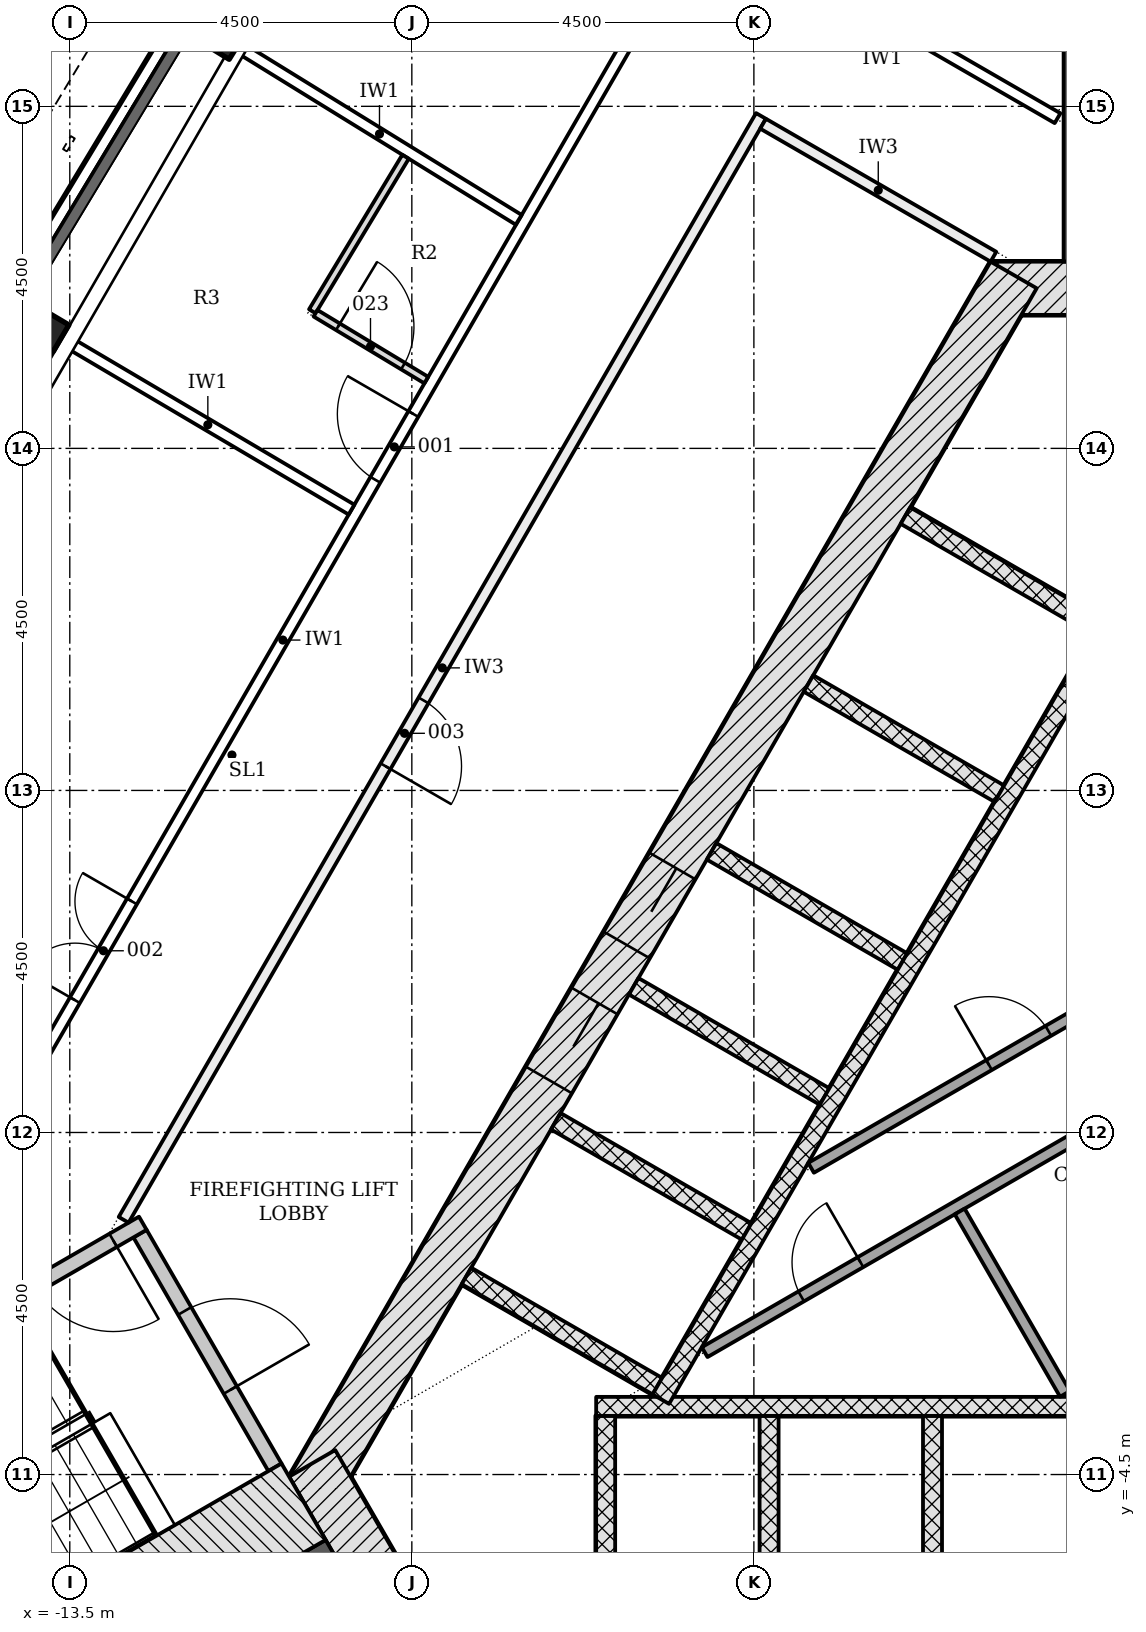
"""IFC4 building model, lengths in metres.
Left out: names, types, materials, properties, quantities, classifications, styles, units other than length and angle.
Written with IfcOpenShell. Run it as: python <this file> out.ifc"""

import sys

from ifc_helpers import new_model, si_unit, direction, frame, frame_2d, origin, origin_2d, place, context, subcontext, project, spatial, rectangle, i_section, extrude, element, fill, save


model = new_model("IFC4")
c1 = context("Model", 3, precision=1e-05, world=origin(), true_north=direction((0.0, 1.0)))
c2 = subcontext(c1, "Body", "Model", "MODEL_VIEW")
j1 = project(units=[si_unit("LENGTHUNIT", "METRE"), si_unit("PLANEANGLEUNIT", "RADIAN")], contexts=[c1])
p1 = place(None, origin())
s1 = spatial("IfcSite", under=j1, at=p1, CompositionType="ELEMENT")
p2 = place(p1, origin())
s2 = spatial("IfcBuilding", under=s1, at=p2, CompositionType="ELEMENT")
p3 = place(p2, frame((0.0, 0.0, 69.0)))
s3 = spatial("IfcBuildingStorey", under=s2, at=p3, CompositionType="ELEMENT", Elevation=69.0)
p4 = place(p3, frame((1.386, 11.106, -0.2), z_axis=(0.0, 0.0, 1.0), x_axis=(-1.0, 0.0, 0.0)))
e1 = element("IfcWall", 1, at=p4, inside=s3, PredefinedType="SHEAR", context=c2, shape_type="SweptSolid", body=[
    extrude(rectangle(XDim=2.771, YDim=0.7, at=frame_2d((1.386, 0.0))), origin(), (0.0, 0.0, 1.0), 3.6),
])
p5 = place(p3, frame((-1.083, 11.281, -0.2), z_axis=(0.0, 0.0, 1.0), x_axis=(-0.500001446645, -0.866024568562, 0.0)))
e2 = element("IfcWall", 2, at=p5, inside=s3, PredefinedType="SHEAR", context=c2, shape_type="SweptSolid", body=[
    extrude(rectangle(XDim=18.458, YDim=0.7, at=frame_2d((9.229, 0.0))), origin(), (0.0, 0.0, 1.0), 3.6),
])
p6 = place(p5, frame((8.979, 0.0, 0.2)))
e3 = element("IfcOpeningElement", 3, at=p6, cuts=e2, PredefinedType="OPENING", context=c2, shape_type="SweptSolid", body=[
    extrude(rectangle(XDim=1.2, YDim=2.1, at=frame_2d((0.6, 1.05))), frame((0.0, 0.36, 0.0), z_axis=(0.0, -1.0, 0.0), x_axis=(1.0, 0.0, 0.0)), (0.0, 0.0, 1.0), 0.72),
])
p7 = place(p5, frame((11.029, 0.0, 0.2)))
e4 = element("IfcOpeningElement", 4, at=p7, cuts=e2, PredefinedType="OPENING", context=c2, shape_type="SweptSolid", body=[
    extrude(rectangle(XDim=1.2, YDim=2.1, at=frame_2d((0.6, 1.05))), frame((0.0, 0.36, 0.0), z_axis=(0.0, -1.0, 0.0), x_axis=(1.0, 0.0, 0.0)), (0.0, 0.0, 1.0), 0.72),
])
p8 = place(p3, frame((-10.311, -4.353, -0.2), z_axis=(0.0, 0.0, 1.0), x_axis=(0.500042739161, -0.866000726912, 0.0)))
e5 = element("IfcWall", 5, at=p8, inside=s3, PredefinedType="SHEAR", context=c2, shape_type="SweptSolid", body=[
    extrude(rectangle(XDim=2.771, YDim=0.7, at=frame_2d((1.386, 0.0))), origin(), (0.0, 0.0, 1.0), 3.6),
])
p9 = place(p3, frame((0.0, 11.456, -0.2), z_axis=(0.0, 0.0, 1.0), x_axis=(0.0, 1.0, 0.0)))
e6 = element("IfcWall", 6, at=p9, inside=s3, PredefinedType="SHEAR", context=c2, shape_type="SweptSolid", body=[
    extrude(rectangle(XDim=13.382, YDim=0.85, at=frame_2d((6.691, 0.0))), origin(), (0.0, 0.0, 1.0), 3.6),
])
p10 = place(p3, frame((-9.922, -5.728, -0.2), z_axis=(0.0, 0.0, 1.0), x_axis=(-0.866026077102, -0.499998833779, 0.0)))
e7 = element("IfcWall", 7, at=p10, inside=s3, PredefinedType="SHEAR", context=c2, shape_type="SweptSolid", body=[
    extrude(rectangle(XDim=13.381, YDim=0.85, at=frame_2d((6.691, 0.0))), origin(), (0.0, 0.0, 1.0), 3.6),
])
for number, where, z_axis, x_axis in (
    (8, (-11.47, 14.397, -0.2), (0.0, 0.0, 1.0), (-0.525, -0.851, 0.0)),
    (9, (-13.789, 10.553, -0.2), (0.0, 0.0, 1.0), (-0.508, -0.861, 0.0)),
):
    element("IfcColumn", number, at=place(p3, frame(where, z_axis=z_axis, x_axis=x_axis)), inside=s3, PredefinedType="COLUMN", context=c2, shape_type="SweptSolid", body=[
        extrude(i_section(OverallWidth=0.404, OverallDepth=0.406, WebThickness=0.027, FlangeThickness=0.044, FilletRadius=0.015, at=origin_2d()), origin(), (0.0, 0.0, 1.0), 3.6),
    ])
for number, where, z_axis, x_axis in (
    (10, (-6.45, -6.228, -0.2), (0.0, 0.0, 1.0), (0.0, 1.0, 0.0)),
    (11, (-4.3, -6.228, -0.2), (0.0, 0.0, 1.0), (0.0, 1.0, 0.0)),
    (12, (-2.15, -6.228, -0.2), (0.0, 0.0, 1.0), (0.0, 1.0, 0.0)),
):
    element("IfcWall", number, at=place(p3, frame(where, z_axis=z_axis, x_axis=x_axis)), inside=s3, PredefinedType="PARTITIONING", context=c2, shape_type="SweptSolid", body=[
        extrude(rectangle(XDim=2.5, YDim=0.25, at=frame_2d((1.25, 0.0))), origin(), (0.0, 0.0, 1.0), 3.6),
    ])
p11 = place(p3, frame((-6.575, -3.603, 0.0), z_axis=(0.0, 0.0, 1.0), x_axis=(1.0, 0.0, 0.0)))
e13 = element("IfcWall", 13, at=p11, inside=s3, PredefinedType="PARTITIONING", context=c2, shape_type="SweptSolid", body=[
    extrude(rectangle(XDim=13.15, YDim=0.25, at=frame_2d((6.575, 0.0))), origin(), (0.0, 0.0, 1.0), 3.4),
])
p12 = place(p3, frame((-2.506, 8.115, -0.2), z_axis=(0.0, 0.0, 1.0), x_axis=(0.865996321171, -0.50005036918, 0.0)))
e14 = element("IfcWall", 14, at=p12, inside=s3, PredefinedType="PARTITIONING", context=c2, shape_type="SweptSolid", body=[
    extrude(rectangle(XDim=2.9, YDim=0.25, at=frame_2d((1.45, 0.0))), origin(), (0.0, 0.0, 1.0), 3.6),
])
for number, where, z_axis, x_axis in (
    (15, (-3.781, 5.907, -0.2), (0.0, 0.0, 1.0), (0.866, -0.5, 0.0)),
    (16, (-5.056, 3.699, -0.2), (0.0, 0.0, 1.0), (0.866, -0.5, 0.0)),
    (17, (-6.081, 1.923, -0.2), (0.0, 0.0, 1.0), (0.866, -0.5, 0.0)),
    (18, (-7.106, 0.148, -0.2), (0.0, 0.0, 1.0), (0.866, -0.5, 0.0)),
    (19, (-8.281, -1.887, -0.2), (0.0, 0.0, 1.0), (0.866, -0.5, 0.0)),
):
    element("IfcWall", number, at=place(p3, frame(where, z_axis=z_axis, x_axis=x_axis)), inside=s3, PredefinedType="PARTITIONING", context=c2, shape_type="SweptSolid", body=[
        extrude(rectangle(XDim=2.9, YDim=0.25, at=frame_2d((1.45, 0.0))), origin(), (0.0, 0.0, 1.0), 3.6),
    ])
p13 = place(p3, frame((0.176, 6.711, 0.0), z_axis=(0.0, 0.0, 1.0), x_axis=(-0.500004227369, -0.866022963098, 0.0)))
e20 = element("IfcWall", 20, at=p13, inside=s3, PredefinedType="PARTITIONING", context=c2, shape_type="SweptSolid", body=[
    extrude(rectangle(XDim=11.8, YDim=0.25, at=frame_2d((5.9, 0.0))), origin(), (0.0, 0.0, 1.0), 3.4),
])
p14 = place(p3, frame((-5.148, -2.89, 0.0), z_axis=(0.0, 0.0, 1.0), x_axis=(0.866030081544, 0.499991897794, 0.0)))
e21 = element("IfcWall", 21, at=p14, inside=s3, PredefinedType="PARTITIONING", context=c2, shape_type="SweptSolid", body=[
    extrude(rectangle(XDim=12.131, YDim=0.15, at=frame_2d((6.065, 0.0))), origin(), (0.0, 0.0, 1.0), 3.4),
])
p15 = place(p14, frame((5.831, 0.0, 0.0)))
e22 = element("IfcOpeningElement", 22, at=p15, cuts=e21, PredefinedType="OPENING", context=c2, shape_type="SweptSolid", body=[
    extrude(rectangle(XDim=0.9, YDim=2.1, at=frame_2d((0.45, 1.05))), frame((0.0, 0.085, 0.0), z_axis=(0.0, -1.0, 0.0), x_axis=(1.0, 0.0, 0.0)), (0.0, 0.0, 1.0), 0.17),
])
p16 = place(p14, frame((1.467, 0.0, 0.0)))
e23 = element("IfcOpeningElement", 23, at=p16, cuts=e21, PredefinedType="OPENING", context=c2, shape_type="SweptSolid", body=[
    extrude(rectangle(XDim=0.9, YDim=2.1, at=frame_2d((0.45, 1.05))), frame((0.0, 0.085, 0.0), z_axis=(0.0, -1.0, 0.0), x_axis=(1.0, 0.0, 0.0)), (0.0, 0.0, 1.0), 0.17),
])
p17 = place(p3, frame((-3.748, -0.465, 0.0), z_axis=(0.0, 0.0, 1.0), x_axis=(0.866033540873, 0.499985905884, 0.0)))
e24 = element("IfcWall", 24, at=p17, inside=s3, PredefinedType="PARTITIONING", context=c2, shape_type="SweptSolid", body=[
    extrude(rectangle(XDim=9.706, YDim=0.15, at=frame_2d((4.853, 0.0))), origin(), (0.0, 0.0, 1.0), 3.4),
])
p18 = place(p17, frame((2.704, 0.0, 0.0)))
e25 = element("IfcOpeningElement", 25, at=p18, cuts=e24, PredefinedType="OPENING", context=c2, shape_type="SweptSolid", body=[
    extrude(rectangle(XDim=0.9, YDim=2.1, at=frame_2d((0.45, 1.05))), frame((0.0, 0.085, 0.0), z_axis=(0.0, -1.0, 0.0), x_axis=(1.0, 0.0, 0.0)), (0.0, 0.0, 1.0), 0.17),
])
p19 = place(p3, frame((-0.407, -3.439, 0.0), z_axis=(0.0, 0.0, 1.0), x_axis=(-0.500004591975, 0.86602275259, 0.0)))
e26 = element("IfcWall", 26, at=p19, inside=s3, PredefinedType="PARTITIONING", context=c2, shape_type="SweptSolid", body=[
    extrude(rectangle(XDim=2.771, YDim=0.15, at=frame_2d((1.386, 0.0))), origin(), (0.0, 0.0, 1.0), 3.4),
])
p20 = place(p3, frame((-12.576, -1.331, -0.2), z_axis=(0.0, 0.0, 1.0), x_axis=(0.499970499736, -0.8660424351, 0.0)))
e27 = element("IfcWall", 27, at=p20, inside=s3, PredefinedType="SHEAR", context=c2, shape_type="SweptSolid", body=[
    extrude(rectangle(XDim=3.55, YDim=0.2, at=frame_2d((1.775, 0.0))), origin(), (0.0, 0.0, 1.0), 3.6),
])
p21 = place(p20, frame((1.175, 0.0, 0.2)))
e28 = element("IfcOpeningElement", 28, at=p21, cuts=e27, PredefinedType="OPENING", context=c2, shape_type="SweptSolid", body=[
    extrude(rectangle(XDim=1.2, YDim=2.1, at=frame_2d((0.6, 1.05))), frame((0.0, 0.11, 0.0), z_axis=(0.0, -1.0, 0.0), x_axis=(1.0, 0.0, 0.0)), (0.0, 0.0, 1.0), 0.22),
])
p22 = place(p3, frame((-12.539, -1.194, -0.2), z_axis=(0.0, 0.0, 1.0), x_axis=(-0.866045472092, -0.499965239061, 0.0)))
e29 = element("IfcWall", 29, at=p22, inside=s3, PredefinedType="SHEAR", context=c2, shape_type="SweptSolid", body=[
    extrude(rectangle(XDim=5.6, YDim=0.2, at=frame_2d((2.8, 0.0))), origin(), (0.0, 0.0, 1.0), 3.6),
])
p23 = place(p22, frame((0.45, 0.0, 0.2)))
e30 = element("IfcOpeningElement", 30, at=p23, cuts=e29, PredefinedType="OPENING", context=c2, shape_type="SweptSolid", body=[
    extrude(rectangle(XDim=1.2, YDim=2.1, at=frame_2d((0.6, 1.05))), frame((0.0, 0.11, 0.0), z_axis=(0.0, -1.0, 0.0), x_axis=(1.0, 0.0, 0.0)), (0.0, 0.0, 1.0), 0.22),
])
p24 = place(p3, frame((-10.424, -4.858, -0.2), z_axis=(0.0, 0.0, 1.0), x_axis=(-0.866033125095, -0.499986626058, 0.0)))
e31 = element("IfcWall", 31, at=p24, inside=s3, PredefinedType="SHEAR", context=c2, shape_type="SweptSolid", body=[
    extrude(rectangle(XDim=7.2, YDim=1.161, at=frame_2d((3.6, 0.0))), origin(), (0.0, 0.0, 1.0), 3.6),
])
p25 = place(p3, frame((-16.256, -3.149, 0.0), z_axis=(0.0, 0.0, 1.0), x_axis=(0.499999683919, 0.866025586274, 0.0)))
e32 = element("IfcWall", 32, at=p25, inside=s3, PredefinedType="PARTITIONING", context=c2, shape_type="SweptSolid", body=[
    extrude(rectangle(XDim=22.234, YDim=0.15, at=frame_2d((11.117, 0.0))), origin(), (0.0, 0.0, 1.0), 2.778),
])
p26 = place(p25, frame((13.551, 0.0, 0.0)))
e33 = element("IfcOpeningElement", 33, at=p26, cuts=e32, PredefinedType="OPENING", context=c2, shape_type="SweptSolid", body=[
    extrude(rectangle(XDim=1.0, YDim=2.1, at=frame_2d((0.5, 1.05))), frame((0.0, 0.085, 0.0), z_axis=(0.0, -1.0, 0.0), x_axis=(1.0, 0.0, 0.0)), (0.0, 0.0, 1.0), 0.17),
])
p27 = place(p25, frame((5.647, 0.0, 0.0)))
e34 = element("IfcOpeningElement", 34, at=p27, cuts=e32, PredefinedType="OPENING", context=c2, shape_type="SweptSolid", body=[
    extrude(rectangle(XDim=1.5, YDim=2.1, at=frame_2d((0.75, 1.05))), frame((0.0, 0.085, 0.0), z_axis=(0.0, -1.0, 0.0), x_axis=(1.0, 0.0, 0.0)), (0.0, 0.0, 1.0), 0.17),
])
p28 = place(p3, frame((-4.407, 13.374, 0.0), z_axis=(0.0, 0.0, 1.0), x_axis=(-0.499997181693, -0.866027030928, 0.0)))
e35 = element("IfcWall", 35, at=p28, inside=s3, PredefinedType="PARTITIONING", context=c2, shape_type="SweptSolid", body=[
    extrude(rectangle(XDim=16.77, YDim=0.15, at=frame_2d((8.385, 0.0))), origin(), (0.0, 0.0, 1.0), 2.778),
])
p29 = place(p28, frame((8.879, 0.0, 0.0)))
e36 = element("IfcOpeningElement", 36, at=p29, cuts=e35, PredefinedType="OPENING", context=c2, shape_type="SweptSolid", body=[
    extrude(rectangle(XDim=1.0, YDim=2.1, at=frame_2d((0.5, 1.05))), frame((0.0, 0.085, 0.0), z_axis=(0.0, -1.0, 0.0), x_axis=(1.0, 0.0, 0.0)), (0.0, 0.0, 1.0), 0.17),
])
p30 = place(p3, frame((-5.111, 16.003, 0.0), z_axis=(0.0, 0.0, 1.0), x_axis=(0.866034245675, -0.499984685083, 0.0)))
e37 = element("IfcWall", 37, at=p30, inside=s3, PredefinedType="PARTITIONING", context=c2, shape_type="SweptSolid", body=[
    extrude(rectangle(XDim=5.319, YDim=0.15, at=frame_2d((2.66, 0.0))), origin(), (0.0, 0.0, 1.0), 3.4),
])
p31 = place(p30, frame((2.084, 0.0, 0.0)))
e38 = element("IfcOpeningElement", 38, at=p31, cuts=e37, PredefinedType="OPENING", context=c2, shape_type="SweptSolid", body=[
    extrude(rectangle(XDim=1.0, YDim=2.1, at=frame_2d((0.5, 1.05))), frame((0.0, 0.085, 0.0), z_axis=(0.0, -1.0, 0.0), x_axis=(1.0, 0.0, 0.0)), (0.0, 0.0, 1.0), 0.17),
])
p32 = place(p3, frame((-4.379, 13.271, 0.0), z_axis=(0.0, 0.0, 1.0), x_axis=(0.866019471182, -0.500010275428, 0.0)))
e39 = element("IfcWall", 39, at=p32, inside=s3, PredefinedType="PARTITIONING", context=c2, shape_type="SweptSolid", body=[
    extrude(rectangle(XDim=3.5, YDim=0.15, at=frame_2d((1.75, 0.0))), origin(), (0.0, 0.0, 1.0), 3.4),
])
p33 = place(p3, frame((-13.574, 10.426, 0.0), z_axis=(0.0, 0.0, 1.0), x_axis=(0.861161165873, -0.508332023772, 0.0)))
e40 = element("IfcWall", 40, at=p33, inside=s3, PredefinedType="PARTITIONING", context=c2, shape_type="SweptSolid", body=[
    extrude(rectangle(XDim=4.39, YDim=0.15, at=frame_2d((2.195, 0.0))), origin(), (0.0, 0.0, 1.0), 2.778),
])
p34 = place(p3, frame((-11.257, 14.266, 0.0), z_axis=(0.0, 0.0, 1.0), x_axis=(0.851192414307, -0.524853764231, 0.0)))
e41 = element("IfcWall", 41, at=p34, inside=s3, PredefinedType="PARTITIONING", context=c2, shape_type="SweptSolid", body=[
    extrude(rectangle(XDim=4.303, YDim=0.15, at=frame_2d((2.152, 0.0))), origin(), (0.0, 0.0, 1.0), 2.778),
])
p35 = place(p3, frame((-9.083, 12.836, 0.0), z_axis=(0.0, 0.0, 1.0), x_axis=(-0.516596087141, -0.856229223252, 0.0)))
e42 = element("IfcWall", 42, at=p35, inside=s3, PredefinedType="PARTITIONING", context=c2, shape_type="SweptSolid", body=[
    extrude(rectangle(XDim=2.374, YDim=0.1, at=frame_2d((1.187, 0.0))), origin(), (0.0, 0.0, 1.0), 2.778),
])
p36 = place(p3, frame((-10.267, 10.778, 0.0), z_axis=(0.0, 0.0, 1.0), x_axis=(0.856198606516, -0.516646829275, 0.0)))
e43 = element("IfcWall", 43, at=p36, inside=s3, PredefinedType="PARTITIONING", context=c2, shape_type="SweptSolid", body=[
    extrude(rectangle(XDim=1.701, YDim=0.1, at=frame_2d((0.851, 0.0))), origin(), (0.0, 0.0, 1.0), 3.4),
])
p37 = place(p36, frame((0.344, 0.0, 0.0)))
e44 = element("IfcOpeningElement", 44, at=p37, cuts=e43, PredefinedType="OPENING", context=c2, shape_type="SweptSolid", body=[
    extrude(rectangle(XDim=1.0, YDim=2.1, at=frame_2d((0.5, 1.05))), frame((0.0, 0.06, 0.0), z_axis=(0.0, -1.0, 0.0), x_axis=(1.0, 0.0, 0.0)), (0.0, 0.0, 1.0), 0.12),
])
p38 = place(p6, origin())
e45 = element("IfcDoor", 45, at=p38, inside=s3, OperationType="DOUBLE_DOOR_SLIDING", PredefinedType="DOOR", context=c2, shape_type="SweptSolid", body=[
    extrude(rectangle(XDim=1.2, YDim=2.1, at=frame_2d((0.6, 1.05))), frame((0.0, 0.025, 0.0), z_axis=(0.0, -1.0, 0.0), x_axis=(1.0, 0.0, 0.0)), (0.0, 0.0, 1.0), 0.05),
])
fill(e3, e45)
p39 = place(p7, origin())
e46 = element("IfcDoor", 46, at=p39, inside=s3, OperationType="DOUBLE_DOOR_SLIDING", PredefinedType="DOOR", context=c2, shape_type="SweptSolid", body=[
    extrude(rectangle(XDim=1.2, YDim=2.1, at=frame_2d((0.6, 1.05))), frame((0.0, 0.025, 0.0), z_axis=(0.0, -1.0, 0.0), x_axis=(1.0, 0.0, 0.0)), (0.0, 0.0, 1.0), 0.05),
])
fill(e4, e46)
p40 = place(p18, origin())
e47 = element("IfcDoor", 47, at=p40, inside=s3, OperationType="SINGLE_SWING_LEFT", PredefinedType="DOOR", context=c2, shape_type="SweptSolid", body=[
    extrude(rectangle(XDim=0.9, YDim=2.1, at=frame_2d((0.45, 1.05))), frame((0.0, 0.025, 0.0), z_axis=(0.0, -1.0, 0.0), x_axis=(1.0, 0.0, 0.0)), (0.0, 0.0, 1.0), 0.05),
])
fill(e25, e47)
p41 = place(p16, origin())
e48 = element("IfcDoor", 48, at=p41, inside=s3, OperationType="SINGLE_SWING_RIGHT", PredefinedType="DOOR", context=c2, shape_type="SweptSolid", body=[
    extrude(rectangle(XDim=0.9, YDim=2.1, at=frame_2d((0.45, 1.05))), frame((0.0, 0.025, 0.0), z_axis=(0.0, -1.0, 0.0), x_axis=(1.0, 0.0, 0.0)), (0.0, 0.0, 1.0), 0.05),
])
fill(e23, e48)
p42 = place(p21, origin())
e49 = element("IfcDoor", 49, at=p42, inside=s3, OperationType="SINGLE_SWING_RIGHT", PredefinedType="DOOR", context=c2, shape_type="SweptSolid", body=[
    extrude(rectangle(XDim=1.2, YDim=2.1, at=frame_2d((0.6, 1.05))), frame((0.0, 0.025, 0.0), z_axis=(0.0, -1.0, 0.0), x_axis=(1.0, 0.0, 0.0)), (0.0, 0.0, 1.0), 0.05),
])
fill(e28, e49)
p43 = place(p23, origin())
e50 = element("IfcDoor", 50, at=p43, inside=s3, OperationType="SINGLE_SWING_LEFT", PredefinedType="DOOR", context=c2, shape_type="SweptSolid", body=[
    extrude(rectangle(XDim=1.2, YDim=2.1, at=frame_2d((0.6, 1.05))), frame((0.0, 0.025, 0.0), z_axis=(0.0, -1.0, 0.0), x_axis=(1.0, 0.0, 0.0)), (0.0, 0.0, 1.0), 0.05),
])
fill(e30, e50)
p44 = place(p26, origin())
e51 = element("IfcDoor", 51, at=p44, inside=s3, OperationType="SINGLE_SWING_RIGHT", PredefinedType="DOOR", context=c2, shape_type="SweptSolid", body=[
    extrude(rectangle(XDim=1.0, YDim=2.1, at=frame_2d((0.5, 1.05))), frame((0.0, 0.025, 0.0), z_axis=(0.0, -1.0, 0.0), x_axis=(1.0, 0.0, 0.0)), (0.0, 0.0, 1.0), 0.05),
])
fill(e33, e51)
p45 = place(p27, origin())
e52 = element("IfcDoor", 52, at=p45, inside=s3, OperationType="DOUBLE_DOOR_SINGLE_SWING", PredefinedType="DOOR", context=c2, shape_type="SweptSolid", body=[
    extrude(rectangle(XDim=1.5, YDim=2.1, at=frame_2d((0.75, 1.05))), frame((0.0, 0.025, 0.0), z_axis=(0.0, -1.0, 0.0), x_axis=(1.0, 0.0, 0.0)), (0.0, 0.0, 1.0), 0.05),
])
fill(e34, e52)
p46 = place(p29, origin())
e53 = element("IfcDoor", 53, at=p46, inside=s3, OperationType="SINGLE_SWING_RIGHT", PredefinedType="DOOR", context=c2, shape_type="SweptSolid", body=[
    extrude(rectangle(XDim=1.0, YDim=2.1, at=frame_2d((0.5, 1.05))), frame((0.0, 0.025, 0.0), z_axis=(0.0, -1.0, 0.0), x_axis=(1.0, 0.0, 0.0)), (0.0, 0.0, 1.0), 0.05),
])
fill(e36, e53)
p47 = place(p37, origin())
e54 = element("IfcDoor", 54, at=p47, inside=s3, OperationType="SINGLE_SWING_LEFT", PredefinedType="DOOR", context=c2, shape_type="SweptSolid", body=[
    extrude(rectangle(XDim=1.0, YDim=2.1, at=frame_2d((0.5, 1.05))), frame((0.0, 0.025, 0.0), z_axis=(0.0, -1.0, 0.0), x_axis=(1.0, 0.0, 0.0)), (0.0, 0.0, 1.0), 0.05),
])
fill(e44, e54)
save(model, sys.argv[1])
